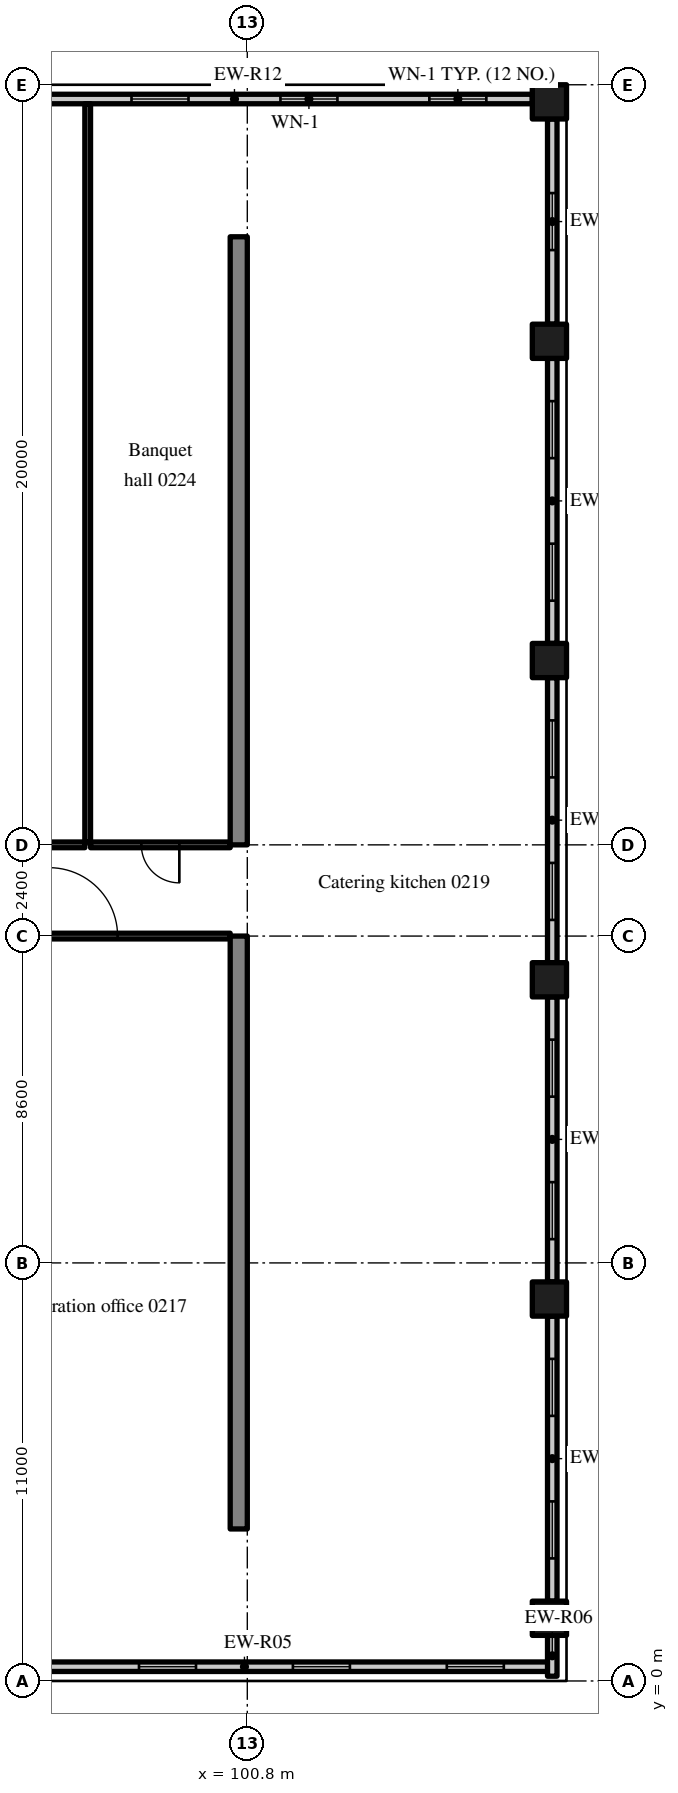
"""IFC4 building model, lengths in metres.
Left out: names, types, materials, properties, quantities, classifications, styles, units other than length and angle.
Written with IfcOpenShell. Run it as: python <this file> out.ifc"""

import sys

from ifc_helpers import new_model, si_unit, direction, frame, frame_2d, origin, origin_2d, place, context, subcontext, project, spatial, rectangle, extrude, source, transform, mapped, element, fill, save


model = new_model("IFC4")
c1 = context("Model", 3, precision=1e-05, world=origin(), true_north=direction((0.0, 1.0)))
c2 = subcontext(c1, "Body", "Model", "MODEL_VIEW")
j1 = project(units=[si_unit("LENGTHUNIT", "METRE"), si_unit("PLANEANGLEUNIT", "RADIAN")], contexts=[c1])
p1 = place(None, origin())
s1 = spatial("IfcSite", under=j1, at=p1, CompositionType="ELEMENT")
p2 = place(p1, origin())
s2 = spatial("IfcBuilding", under=s1, at=p2, CompositionType="ELEMENT")
p3 = place(p2, frame((0.0, 0.0, 11.4)))
s3 = spatial("IfcBuildingStorey", under=s2, at=p3, CompositionType="ELEMENT", Elevation=11.4)
m1 = source(origin(), c2, "Body", "SweptSolid", [
    extrude(rectangle(XDim=15.6, YDim=0.45, at=frame_2d((7.8, 0.0))), origin(), (0.0, 0.0, 1.0), 6.32),
])
p4 = place(p3, frame((100.575, 4.0, 0.0), z_axis=(0.0, 0.0, 1.0), x_axis=(0.0, 1.0, 0.0)))
e1 = element("IfcWall", 1, at=p4, inside=s3, PredefinedType="SHEAR", context=c2, shape_type="MappedRepresentation", body=[
    mapped(m1, transform((0.0, 0.0, 0.0), scale=1.0)),
])
m2 = source(origin(), c2, "Body", "SweptSolid", [
    extrude(rectangle(XDim=16.0, YDim=0.45, at=frame_2d((8.0, 0.0))), origin(), (0.0, 0.0, 1.0), 6.32),
])
p5 = place(p3, frame((100.575, 22.0, 0.0), z_axis=(0.0, 0.0, 1.0), x_axis=(0.0, 1.0, 0.0)))
e2 = element("IfcWall", 2, at=p5, inside=s3, PredefinedType="SHEAR", context=c2, shape_type="MappedRepresentation", body=[
    mapped(m2, transform((0.0, 0.0, 0.0), scale=1.0)),
])
m3 = source(origin(), c2, "Body", "SweptSolid", [
    extrude(rectangle(XDim=0.9, YDim=0.9, at=origin_2d()), origin(), (0.0, 0.0, 1.0), 6.32),
])
for number, where, z_axis, x_axis in (
    (3, (108.75, 1.65, 0.0), (0.0, 0.0, 1.0), (1.0, 0.0, 0.0)),
    (4, (108.75, 10.05, 0.0), (0.0, 0.0, 1.0), (1.0, 0.0, 0.0)),
    (5, (108.75, 18.45, 0.0), (0.0, 0.0, 1.0), (1.0, 0.0, 0.0)),
    (6, (108.75, 26.85, 0.0), (0.0, 0.0, 1.0), (1.0, 0.0, 0.0)),
    (7, (108.75, 35.25, 0.0), (0.0, 0.0, 1.0), (1.0, 0.0, 0.0)),
    (8, (108.75, 41.55, 0.0), (0.0, 0.0, 1.0), (1.0, 0.0, 0.0)),
):
    element("IfcColumn", number, at=place(p3, frame(where, z_axis=z_axis, x_axis=x_axis)), inside=s3, PredefinedType="COLUMN", context=c2, shape_type="MappedRepresentation", body=[
        mapped(m3, transform((0.0, 0.0, 0.0), scale=1.0)),
    ])
m4 = source(origin(), c2, "Body", "SweptSolid", [
    extrude(rectangle(XDim=16.2, YDim=0.25, at=frame_2d((8.1, 0.0))), origin(), (0.0, 0.0, 1.0), 5.57),
])
p6 = place(p3, frame((92.625, 0.375, 0.0), z_axis=(0.0, 0.0, 1.0), x_axis=(1.0, 0.0, 0.0)))
e9 = element("IfcWall", 9, at=p6, inside=s3, PredefinedType="SOLIDWALL", context=c2, shape_type="MappedRepresentation", body=[
    mapped(m4, transform((0.0, 0.0, 0.0), scale=1.0)),
])
m5 = source(origin(), c2, "Body", "SweptSolid", [
    extrude(rectangle(XDim=1.5, YDim=2.0, at=frame_2d((0.75, 1.0))), frame((0.0, 0.135, 0.0), z_axis=(0.0, -1.0, 0.0), x_axis=(1.0, 0.0, 0.0)), (0.0, 0.0, 1.0), 0.27),
])
p7 = place(p6, frame((1.275, 0.0, 0.9)))
e10 = element("IfcOpeningElement", 10, at=p7, cuts=e9, PredefinedType="OPENING", context=c2, shape_type="MappedRepresentation", body=[
    mapped(m5, transform((0.0, 0.0, 0.0), scale=1.0)),
])
p8 = place(p6, frame((5.325, 0.0, 0.9)))
e11 = element("IfcOpeningElement", 11, at=p8, cuts=e9, PredefinedType="OPENING", context=c2, shape_type="MappedRepresentation", body=[
    mapped(m5, transform((0.0, 0.0, 0.0), scale=1.0)),
])
p9 = place(p6, frame((9.375, 0.0, 0.9)))
e12 = element("IfcOpeningElement", 12, at=p9, cuts=e9, PredefinedType="OPENING", context=c2, shape_type="MappedRepresentation", body=[
    mapped(m5, transform((0.0, 0.0, 0.0), scale=1.0)),
])
p10 = place(p6, frame((13.425, 0.0, 0.9)))
e13 = element("IfcOpeningElement", 13, at=p10, cuts=e9, PredefinedType="OPENING", context=c2, shape_type="MappedRepresentation", body=[
    mapped(m5, transform((0.0, 0.0, 0.0), scale=1.0)),
])
m6 = source(origin(), c2, "Body", "SweptSolid", [
    extrude(rectangle(XDim=1.075, YDim=0.25, at=frame_2d((0.538, 0.0))), origin(), (0.0, 0.0, 1.0), 5.32),
])
p11 = place(p3, frame((108.825, 0.125, 0.0), z_axis=(0.0, 0.0, 1.0), x_axis=(0.0, 1.0, 0.0)))
e14 = element("IfcWall", 14, at=p11, inside=s3, PredefinedType="SOLIDWALL", context=c2, shape_type="MappedRepresentation", body=[
    mapped(m6, transform((0.0, 0.0, 0.0), scale=1.0)),
])
m7 = source(origin(), c2, "Body", "SweptSolid", [
    extrude(rectangle(XDim=7.5, YDim=0.25, at=frame_2d((3.75, 0.0))), origin(), (0.0, 0.0, 1.0), 5.32),
])
p12 = place(p3, frame((108.825, 2.1, 0.0), z_axis=(0.0, 0.0, 1.0), x_axis=(0.0, 1.0, 0.0)))
e15 = element("IfcWall", 15, at=p12, inside=s3, PredefinedType="SOLIDWALL", context=c2, shape_type="MappedRepresentation", body=[
    mapped(m7, transform((0.0, 0.0, 0.0), scale=1.0)),
])
p13 = place(p12, frame((1.125, 0.0, 0.9)))
e16 = element("IfcOpeningElement", 16, at=p13, cuts=e15, PredefinedType="OPENING", context=c2, shape_type="MappedRepresentation", body=[
    mapped(m5, transform((0.0, 0.0, 0.0), scale=1.0)),
])
p14 = place(p12, frame((4.875, 0.0, 0.9)))
e17 = element("IfcOpeningElement", 17, at=p14, cuts=e15, PredefinedType="OPENING", context=c2, shape_type="MappedRepresentation", body=[
    mapped(m5, transform((0.0, 0.0, 0.0), scale=1.0)),
])
p15 = place(p3, frame((108.825, 10.5, 0.0), z_axis=(0.0, 0.0, 1.0), x_axis=(0.0, 1.0, 0.0)))
e18 = element("IfcWall", 18, at=p15, inside=s3, PredefinedType="SOLIDWALL", context=c2, shape_type="MappedRepresentation", body=[
    mapped(m7, transform((0.0, 0.0, 0.0), scale=1.0)),
])
p16 = place(p15, frame((1.125, 0.0, 0.9)))
e19 = element("IfcOpeningElement", 19, at=p16, cuts=e18, PredefinedType="OPENING", context=c2, shape_type="MappedRepresentation", body=[
    mapped(m5, transform((0.0, 0.0, 0.0), scale=1.0)),
])
p17 = place(p15, frame((4.875, 0.0, 0.9)))
e20 = element("IfcOpeningElement", 20, at=p17, cuts=e18, PredefinedType="OPENING", context=c2, shape_type="MappedRepresentation", body=[
    mapped(m5, transform((0.0, 0.0, 0.0), scale=1.0)),
])
p18 = place(p3, frame((108.825, 18.9, 0.0), z_axis=(0.0, 0.0, 1.0), x_axis=(0.0, 1.0, 0.0)))
e21 = element("IfcWall", 21, at=p18, inside=s3, PredefinedType="SOLIDWALL", context=c2, shape_type="MappedRepresentation", body=[
    mapped(m7, transform((0.0, 0.0, 0.0), scale=1.0)),
])
p19 = place(p18, frame((1.125, 0.0, 0.9)))
e22 = element("IfcOpeningElement", 22, at=p19, cuts=e21, PredefinedType="OPENING", context=c2, shape_type="MappedRepresentation", body=[
    mapped(m5, transform((0.0, 0.0, 0.0), scale=1.0)),
])
p20 = place(p18, frame((4.875, 0.0, 0.9)))
e23 = element("IfcOpeningElement", 23, at=p20, cuts=e21, PredefinedType="OPENING", context=c2, shape_type="MappedRepresentation", body=[
    mapped(m5, transform((0.0, 0.0, 0.0), scale=1.0)),
])
p21 = place(p3, frame((108.825, 27.3, 0.0), z_axis=(0.0, 0.0, 1.0), x_axis=(0.0, 1.0, 0.0)))
e24 = element("IfcWall", 24, at=p21, inside=s3, PredefinedType="SOLIDWALL", context=c2, shape_type="MappedRepresentation", body=[
    mapped(m7, transform((0.0, 0.0, 0.0), scale=1.0)),
])
p22 = place(p21, frame((1.125, 0.0, 0.9)))
e25 = element("IfcOpeningElement", 25, at=p22, cuts=e24, PredefinedType="OPENING", context=c2, shape_type="MappedRepresentation", body=[
    mapped(m5, transform((0.0, 0.0, 0.0), scale=1.0)),
])
p23 = place(p21, frame((4.875, 0.0, 0.9)))
e26 = element("IfcOpeningElement", 26, at=p23, cuts=e24, PredefinedType="OPENING", context=c2, shape_type="MappedRepresentation", body=[
    mapped(m5, transform((0.0, 0.0, 0.0), scale=1.0)),
])
m8 = source(origin(), c2, "Body", "SweptSolid", [
    extrude(rectangle(XDim=5.4, YDim=0.25, at=frame_2d((2.7, 0.0))), origin(), (0.0, 0.0, 1.0), 5.32),
])
p24 = place(p3, frame((108.825, 35.7, 0.0), z_axis=(0.0, 0.0, 1.0), x_axis=(0.0, 1.0, 0.0)))
e27 = element("IfcWall", 27, at=p24, inside=s3, PredefinedType="SOLIDWALL", context=c2, shape_type="MappedRepresentation", body=[
    mapped(m8, transform((0.0, 0.0, 0.0), scale=1.0)),
])
p25 = place(p24, frame((1.95, 0.0, 0.9)))
e28 = element("IfcOpeningElement", 28, at=p25, cuts=e27, PredefinedType="OPENING", context=c2, shape_type="MappedRepresentation", body=[
    mapped(m5, transform((0.0, 0.0, 0.0), scale=1.0)),
])
m9 = source(origin(), c2, "Body", "SweptSolid", [
    extrude(rectangle(XDim=15.675, YDim=0.25, at=frame_2d((7.837, 0.0))), origin(), (0.0, 0.0, 1.0), 5.57),
])
p26 = place(p3, frame((108.3, 41.625, 0.0), z_axis=(0.0, 0.0, 1.0), x_axis=(-1.0, 0.0, 0.0)))
e29 = element("IfcWall", 29, at=p26, inside=s3, PredefinedType="SOLIDWALL", context=c2, shape_type="MappedRepresentation", body=[
    mapped(m9, transform((0.0, 0.0, 0.0), scale=1.0)),
])
m10 = source(origin(), c2, "Body", "SweptSolid", [
    extrude(rectangle(XDim=1.5, YDim=1.5, at=frame_2d((0.75, 0.75))), frame((0.0, 0.135, 0.0), z_axis=(0.0, -1.0, 0.0), x_axis=(1.0, 0.0, 0.0)), (0.0, 0.0, 1.0), 0.27),
])
p27 = place(p26, frame((1.209, 0.0, 0.9)))
e30 = element("IfcOpeningElement", 30, at=p27, cuts=e29, PredefinedType="OPENING", context=c2, shape_type="MappedRepresentation", body=[
    mapped(m10, transform((0.0, 0.0, 0.0), scale=1.0)),
])
p28 = place(p26, frame((5.128, 0.0, 0.9)))
e31 = element("IfcOpeningElement", 31, at=p28, cuts=e29, PredefinedType="OPENING", context=c2, shape_type="MappedRepresentation", body=[
    mapped(m10, transform((0.0, 0.0, 0.0), scale=1.0)),
])
p29 = place(p26, frame((9.047, 0.0, 0.9)))
e32 = element("IfcOpeningElement", 32, at=p29, cuts=e29, PredefinedType="OPENING", context=c2, shape_type="MappedRepresentation", body=[
    mapped(m10, transform((0.0, 0.0, 0.0), scale=1.0)),
])
p30 = place(p26, frame((12.966, 0.0, 0.9)))
e33 = element("IfcOpeningElement", 33, at=p30, cuts=e29, PredefinedType="OPENING", context=c2, shape_type="MappedRepresentation", body=[
    mapped(m10, transform((0.0, 0.0, 0.0), scale=1.0)),
])
m11 = source(origin(), c2, "Body", "SweptSolid", [
    extrude(rectangle(XDim=7.725, YDim=0.15, at=frame_2d((3.863, 0.0))), origin(), (0.0, 0.0, 1.0), 5.62),
])
p31 = place(p3, frame((92.625, 19.6, 0.0), z_axis=(0.0, 0.0, 1.0), x_axis=(1.0, 0.0, 0.0)))
e34 = element("IfcWall", 34, at=p31, inside=s3, PredefinedType="PARTITIONING", context=c2, shape_type="MappedRepresentation", body=[
    mapped(m11, transform((0.0, 0.0, 0.0), scale=1.0)),
])
m12 = source(origin(), c2, "Body", "SweptSolid", [
    extrude(rectangle(XDim=1.8, YDim=2.1, at=frame_2d((0.9, 1.05))), frame((0.0, 0.085, 0.0), z_axis=(0.0, -1.0, 0.0), x_axis=(1.0, 0.0, 0.0)), (0.0, 0.0, 1.0), 0.17),
])
p32 = place(p31, frame((2.962, 0.0, 0.0)))
e35 = element("IfcOpeningElement", 35, at=p32, cuts=e34, PredefinedType="OPENING", context=c2, shape_type="MappedRepresentation", body=[
    mapped(m12, transform((0.0, 0.0, 0.0), scale=1.0)),
])
m13 = source(origin(), c2, "Body", "SweptSolid", [
    extrude(rectangle(XDim=3.9, YDim=0.15, at=frame_2d((1.95, 0.0))), origin(), (0.0, 0.0, 1.0), 5.62),
])
p33 = place(p3, frame((92.625, 22.0, 0.0), z_axis=(0.0, 0.0, 1.0), x_axis=(1.0, 0.0, 0.0)))
e36 = element("IfcWall", 36, at=p33, inside=s3, PredefinedType="PARTITIONING", context=c2, shape_type="MappedRepresentation", body=[
    mapped(m13, transform((0.0, 0.0, 0.0), scale=1.0)),
])
m14 = source(origin(), c2, "Body", "SweptSolid", [
    extrude(rectangle(XDim=1.0, YDim=2.1, at=frame_2d((0.5, 1.05))), frame((0.0, 0.085, 0.0), z_axis=(0.0, -1.0, 0.0), x_axis=(1.0, 0.0, 0.0)), (0.0, 0.0, 1.0), 0.17),
])
p34 = place(p33, frame((1.45, 0.0, 0.0)))
e37 = element("IfcOpeningElement", 37, at=p34, cuts=e36, PredefinedType="OPENING", context=c2, shape_type="MappedRepresentation", body=[
    mapped(m14, transform((0.0, 0.0, 0.0), scale=1.0)),
])
m15 = source(origin(), c2, "Body", "SweptSolid", [
    extrude(rectangle(XDim=3.675, YDim=0.15, at=frame_2d((1.837, 0.0))), origin(), (0.0, 0.0, 1.0), 5.62),
])
p35 = place(p3, frame((96.675, 22.0, 0.0), z_axis=(0.0, 0.0, 1.0), x_axis=(1.0, 0.0, 0.0)))
e38 = element("IfcWall", 38, at=p35, inside=s3, PredefinedType="PARTITIONING", context=c2, shape_type="MappedRepresentation", body=[
    mapped(m15, transform((0.0, 0.0, 0.0), scale=1.0)),
])
p36 = place(p35, frame((1.337, 0.0, 0.0)))
e39 = element("IfcOpeningElement", 39, at=p36, cuts=e38, PredefinedType="OPENING", context=c2, shape_type="MappedRepresentation", body=[
    mapped(m14, transform((0.0, 0.0, 0.0), scale=1.0)),
])
m16 = source(origin(), c2, "Body", "SweptSolid", [
    extrude(rectangle(XDim=19.425, YDim=0.15, at=frame_2d((9.712, 0.0))), origin(), (0.0, 0.0, 1.0), 6.32),
])
p37 = place(p3, frame((96.6, 22.075, 0.0), z_axis=(0.0, 0.0, 1.0), x_axis=(0.0, 1.0, 0.0)))
e40 = element("IfcWall", 40, at=p37, inside=s3, PredefinedType="PARTITIONING", context=c2, shape_type="MappedRepresentation", body=[
    mapped(m16, transform((0.0, 0.0, 0.0), scale=1.0)),
])
m17 = source(origin(), c2, "Body", "SweptSolid", [
    extrude(rectangle(XDim=1.5, YDim=2.0, at=frame_2d((0.75, 1.0))), frame((0.0, 0.03, 0.0), z_axis=(0.0, -1.0, 0.0), x_axis=(1.0, 0.0, 0.0)), (0.0, 0.0, 1.0), 0.06),
])
p38 = place(p8, origin())
e41 = element("IfcWindow", 41, at=p38, inside=s3, PartitioningType="SINGLE_PANEL", PredefinedType="WINDOW", context=c2, shape_type="MappedRepresentation", body=[
    mapped(m17, transform((0.0, 0.0, 0.0), scale=1.0)),
])
fill(e11, e41)
p39 = place(p9, origin())
e42 = element("IfcWindow", 42, at=p39, inside=s3, PartitioningType="SINGLE_PANEL", PredefinedType="WINDOW", context=c2, shape_type="MappedRepresentation", body=[
    mapped(m17, transform((0.0, 0.0, 0.0), scale=1.0)),
])
fill(e12, e42)
p40 = place(p10, origin())
e43 = element("IfcWindow", 43, at=p40, inside=s3, PartitioningType="SINGLE_PANEL", PredefinedType="WINDOW", context=c2, shape_type="MappedRepresentation", body=[
    mapped(m17, transform((0.0, 0.0, 0.0), scale=1.0)),
])
fill(e13, e43)
p41 = place(p13, origin())
e44 = element("IfcWindow", 44, at=p41, inside=s3, PartitioningType="SINGLE_PANEL", PredefinedType="WINDOW", context=c2, shape_type="MappedRepresentation", body=[
    mapped(m17, transform((0.0, 0.0, 0.0), scale=1.0)),
])
fill(e16, e44)
p42 = place(p14, origin())
e45 = element("IfcWindow", 45, at=p42, inside=s3, PartitioningType="SINGLE_PANEL", PredefinedType="WINDOW", context=c2, shape_type="MappedRepresentation", body=[
    mapped(m17, transform((0.0, 0.0, 0.0), scale=1.0)),
])
fill(e17, e45)
p43 = place(p16, origin())
e46 = element("IfcWindow", 46, at=p43, inside=s3, PartitioningType="SINGLE_PANEL", PredefinedType="WINDOW", context=c2, shape_type="MappedRepresentation", body=[
    mapped(m17, transform((0.0, 0.0, 0.0), scale=1.0)),
])
fill(e19, e46)
p44 = place(p17, origin())
e47 = element("IfcWindow", 47, at=p44, inside=s3, PartitioningType="SINGLE_PANEL", PredefinedType="WINDOW", context=c2, shape_type="MappedRepresentation", body=[
    mapped(m17, transform((0.0, 0.0, 0.0), scale=1.0)),
])
fill(e20, e47)
p45 = place(p19, origin())
e48 = element("IfcWindow", 48, at=p45, inside=s3, PartitioningType="SINGLE_PANEL", PredefinedType="WINDOW", context=c2, shape_type="MappedRepresentation", body=[
    mapped(m17, transform((0.0, 0.0, 0.0), scale=1.0)),
])
fill(e22, e48)
p46 = place(p20, origin())
e49 = element("IfcWindow", 49, at=p46, inside=s3, PartitioningType="SINGLE_PANEL", PredefinedType="WINDOW", context=c2, shape_type="MappedRepresentation", body=[
    mapped(m17, transform((0.0, 0.0, 0.0), scale=1.0)),
])
fill(e23, e49)
p47 = place(p22, origin())
e50 = element("IfcWindow", 50, at=p47, inside=s3, PartitioningType="SINGLE_PANEL", PredefinedType="WINDOW", context=c2, shape_type="MappedRepresentation", body=[
    mapped(m17, transform((0.0, 0.0, 0.0), scale=1.0)),
])
fill(e25, e50)
p48 = place(p23, origin())
e51 = element("IfcWindow", 51, at=p48, inside=s3, PartitioningType="SINGLE_PANEL", PredefinedType="WINDOW", context=c2, shape_type="MappedRepresentation", body=[
    mapped(m17, transform((0.0, 0.0, 0.0), scale=1.0)),
])
fill(e26, e51)
p49 = place(p25, origin())
e52 = element("IfcWindow", 52, at=p49, inside=s3, PartitioningType="SINGLE_PANEL", PredefinedType="WINDOW", context=c2, shape_type="MappedRepresentation", body=[
    mapped(m17, transform((0.0, 0.0, 0.0), scale=1.0)),
])
fill(e28, e52)
m18 = source(origin(), c2, "Body", "SweptSolid", [
    extrude(rectangle(XDim=1.5, YDim=1.5, at=frame_2d((0.75, 0.75))), frame((0.0, 0.03, 0.0), z_axis=(0.0, -1.0, 0.0), x_axis=(1.0, 0.0, 0.0)), (0.0, 0.0, 1.0), 0.06),
])
p50 = place(p27, origin())
e53 = element("IfcWindow", 53, at=p50, inside=s3, PartitioningType="SINGLE_PANEL", PredefinedType="WINDOW", context=c2, shape_type="MappedRepresentation", body=[
    mapped(m18, transform((0.0, 0.0, 0.0), scale=1.0)),
])
fill(e30, e53)
p51 = place(p28, origin())
e54 = element("IfcWindow", 54, at=p51, inside=s3, PartitioningType="SINGLE_PANEL", PredefinedType="WINDOW", context=c2, shape_type="MappedRepresentation", body=[
    mapped(m18, transform((0.0, 0.0, 0.0), scale=1.0)),
])
fill(e31, e54)
p52 = place(p29, origin())
e55 = element("IfcWindow", 55, at=p52, inside=s3, PartitioningType="SINGLE_PANEL", PredefinedType="WINDOW", context=c2, shape_type="MappedRepresentation", body=[
    mapped(m18, transform((0.0, 0.0, 0.0), scale=1.0)),
])
fill(e32, e55)
m19 = source(origin(), c2, "Body", "SweptSolid", [
    extrude(rectangle(XDim=1.8, YDim=2.1, at=frame_2d((0.9, 1.05))), frame((0.0, 0.025, 0.0), z_axis=(0.0, -1.0, 0.0), x_axis=(1.0, 0.0, 0.0)), (0.0, 0.0, 1.0), 0.05),
])
p53 = place(p32, origin())
e56 = element("IfcDoor", 56, at=p53, inside=s3, OperationType="DOUBLE_DOOR_SINGLE_SWING", PredefinedType="DOOR", context=c2, shape_type="MappedRepresentation", body=[
    mapped(m19, transform((0.0, 0.0, 0.0), scale=1.0)),
])
fill(e35, e56)
m20 = source(origin(), c2, "Body", "SweptSolid", [
    extrude(rectangle(XDim=1.0, YDim=2.1, at=frame_2d((0.5, 1.05))), frame((0.0, 0.025, 0.0), z_axis=(0.0, -1.0, 0.0), x_axis=(1.0, 0.0, 0.0)), (0.0, 0.0, 1.0), 0.05),
])
p54 = place(p36, origin())
e57 = element("IfcDoor", 57, at=p54, inside=s3, OperationType="SINGLE_SWING_RIGHT", PredefinedType="DOOR", context=c2, shape_type="MappedRepresentation", body=[
    mapped(m20, transform((0.0, 0.0, 0.0), scale=1.0)),
])
fill(e39, e57)
save(model, sys.argv[1])
